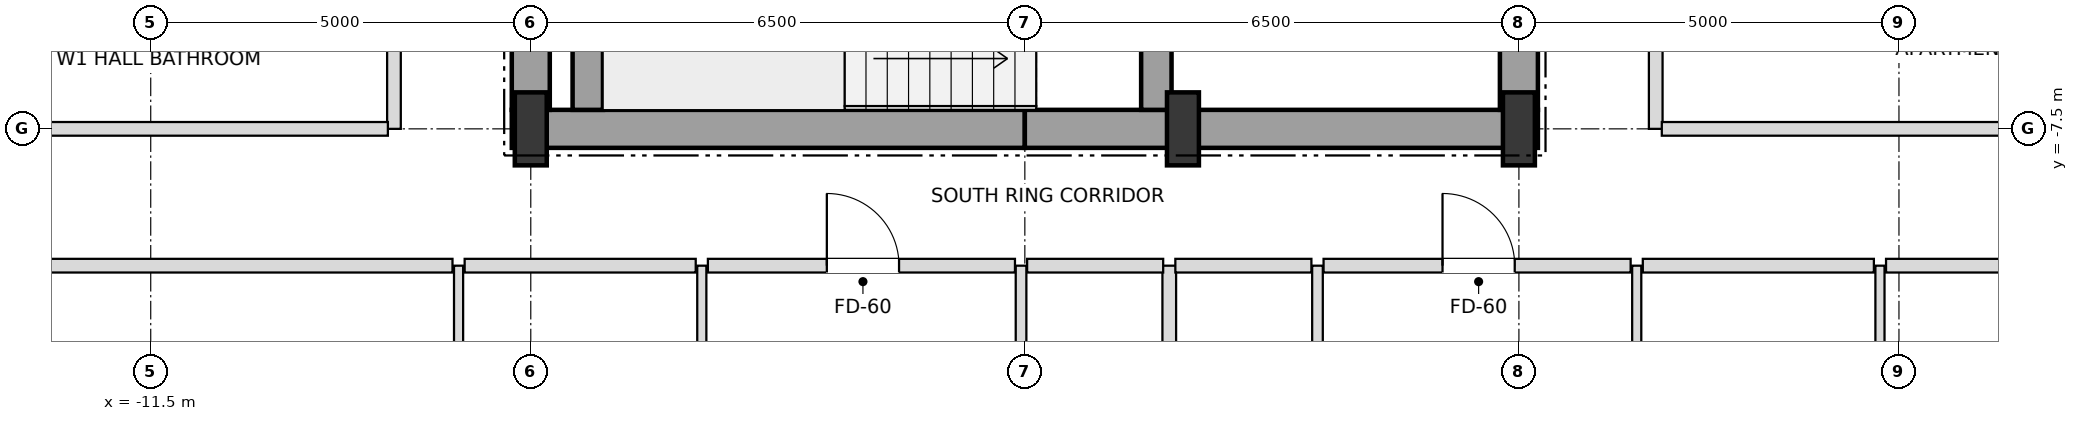
"""IFC4 building model, lengths in metres.
Left out: names, types, materials, properties, quantities, classifications, styles, units other than length and angle.
Written with IfcOpenShell. Run it as: python <this file> out.ifc"""

import sys

from ifc_helpers import new_model, si_unit, direction, frame, frame_2d, origin, origin_2d, place, context, subcontext, project, spatial, rectangle, i_section, extrude, element, fill, save


model = new_model("IFC4")
c1 = context("Model", 3, precision=1e-05, world=origin(), true_north=direction((0.0, 1.0)))
c2 = subcontext(c1, "Body", "Model", "MODEL_VIEW")
j1 = project(units=[si_unit("LENGTHUNIT", "METRE"), si_unit("PLANEANGLEUNIT", "RADIAN")], contexts=[c1])
p1 = place(None, origin())
s1 = spatial("IfcSite", under=j1, at=p1, CompositionType="ELEMENT")
p2 = place(p1, origin())
s2 = spatial("IfcBuilding", under=s1, at=p2, CompositionType="ELEMENT")
p3 = place(p2, frame((0.0, 0.0, 50.4)))
s3 = spatial("IfcBuildingStorey", under=s2, at=p3, CompositionType="ELEMENT", Elevation=50.4)
for number, where, z_axis, x_axis in (
    (1, (-6.5, -7.5, 0.0), (0.0, 0.0, 1.0), (1.0, 0.0, 0.0)),
    (2, (2.08, -7.5, 0.0), (0.0, 0.0, 1.0), (1.0, 0.0, 0.0)),
    (3, (6.5, -7.5, 0.0), (0.0, 0.0, 1.0), (1.0, 0.0, 0.0)),
):
    element("IfcColumn", number, at=place(p3, frame(where, z_axis=z_axis, x_axis=x_axis)), inside=s3, PredefinedType="COLUMN", context=c2, shape_type="SweptSolid", body=[
        extrude(i_section(OverallWidth=0.42, OverallDepth=0.96, WebThickness=0.022, FlangeThickness=0.034, at=origin_2d()), origin(), (0.0, 0.0, 1.0), 3.6),
    ])
for number, where, z_axis, x_axis in (
    (4, (-6.75, -7.5, 0.0), (0.0, 0.0, 1.0), (1.0, 0.0, 0.0)),
    (5, (0.0, -7.5, 0.0), (0.0, 0.0, 1.0), (1.0, 0.0, 0.0)),
):
    element("IfcWall", number, at=place(p3, frame(where, z_axis=z_axis, x_axis=x_axis)), inside=s3, PredefinedType="SHEAR", context=c2, shape_type="SweptSolid", body=[
        extrude(rectangle(XDim=6.75, YDim=0.5, at=frame_2d((3.375, 0.0))), origin(), (0.0, 0.0, 1.0), 3.38),
    ])
p4 = place(p3, frame((-6.5, -7.25, 0.0), z_axis=(0.0, 0.0, 1.0), x_axis=(0.0, 1.0, 0.0)))
e6 = element("IfcWall", 6, at=p4, inside=s3, PredefinedType="SHEAR", context=c2, shape_type="SweptSolid", body=[
    extrude(rectangle(XDim=3.55, YDim=0.5, at=frame_2d((1.775, 0.0))), origin(), (0.0, 0.0, 1.0), 3.38),
])
p5 = place(p3, frame((6.5, -7.25, 0.0), z_axis=(0.0, 0.0, 1.0), x_axis=(0.0, 1.0, 0.0)))
e7 = element("IfcWall", 7, at=p5, inside=s3, PredefinedType="SHEAR", context=c2, shape_type="SweptSolid", body=[
    extrude(rectangle(XDim=5.75, YDim=0.5, at=frame_2d((2.875, 0.0))), origin(), (0.0, 0.0, 1.0), 3.38),
])
p6 = place(p5, frame((0.85, 0.0, 0.0)))
e8 = element("IfcOpeningElement", 8, at=p6, cuts=e7, PredefinedType="OPENING", context=c2, shape_type="SweptSolid", body=[
    extrude(rectangle(XDim=1.05, YDim=2.15, at=frame_2d((0.525, 1.075))), frame((0.0, 0.26, 0.0), z_axis=(0.0, -1.0, 0.0), x_axis=(1.0, 0.0, 0.0)), (0.0, 0.0, 1.0), 0.52),
])
p7 = place(p3, frame((-5.75, -7.25, 0.0), z_axis=(0.0, 0.0, 1.0), x_axis=(0.0, 1.0, 0.0)))
e9 = element("IfcWall", 9, at=p7, inside=s3, PredefinedType="SHEAR", context=c2, shape_type="SweptSolid", body=[
    extrude(rectangle(XDim=2.9, YDim=0.4, at=frame_2d((1.45, 0.0))), origin(), (0.0, 0.0, 1.0), 3.38),
])
p8 = place(p3, frame((1.73, -7.25, 0.0), z_axis=(0.0, 0.0, 1.0), x_axis=(0.0, 1.0, 0.0)))
e10 = element("IfcWall", 10, at=p8, inside=s3, PredefinedType="SHEAR", context=c2, shape_type="SweptSolid", body=[
    extrude(rectangle(XDim=3.3, YDim=0.4, at=frame_2d((1.65, 0.0))), origin(), (0.0, 0.0, 1.0), 3.38),
])
p9 = place(p8, frame((0.9, 0.0, 0.0)))
e11 = element("IfcOpeningElement", 11, at=p9, cuts=e10, PredefinedType="OPENING", context=c2, shape_type="SweptSolid", body=[
    extrude(rectangle(XDim=1.05, YDim=2.15, at=frame_2d((0.525, 1.075))), frame((0.0, 0.21, 0.0), z_axis=(0.0, -1.0, 0.0), x_axis=(1.0, 0.0, 0.0)), (0.0, 0.0, 1.0), 0.42),
])
p10 = place(p3, frame((-8.3, -7.5, 0.0), z_axis=(0.0, 0.0, 1.0), x_axis=(0.0, 1.0, 0.0)))
e12 = element("IfcWall", 12, at=p10, inside=s3, PredefinedType="PARTITIONING", context=c2, shape_type="SweptSolid", body=[
    extrude(rectangle(XDim=15.0, YDim=0.18, at=frame_2d((7.5, 0.0))), origin(), (0.0, 0.0, 1.0), 3.38),
])
p11 = place(p10, frame((3.565, 0.0, 0.0)))
e13 = element("IfcOpeningElement", 13, at=p11, cuts=e12, PredefinedType="OPENING", context=c2, shape_type="SweptSolid", body=[
    extrude(rectangle(XDim=0.95, YDim=2.15, at=frame_2d((0.475, 1.075))), frame((0.0, 0.1, 0.0), z_axis=(0.0, -1.0, 0.0), x_axis=(1.0, 0.0, 0.0)), (0.0, 0.0, 1.0), 0.2),
])
p12 = place(p10, frame((11.145, 0.0, 0.0)))
e14 = element("IfcOpeningElement", 14, at=p12, cuts=e12, PredefinedType="OPENING", context=c2, shape_type="SweptSolid", body=[
    extrude(rectangle(XDim=0.95, YDim=2.15, at=frame_2d((0.475, 1.075))), frame((0.0, 0.1, 0.0), z_axis=(0.0, -1.0, 0.0), x_axis=(1.0, 0.0, 0.0)), (0.0, 0.0, 1.0), 0.2),
])
p13 = place(p3, frame((-7.45, -18.9, 0.0), z_axis=(0.0, 0.0, 1.0), x_axis=(0.0, 1.0, 0.0)))
e15 = element("IfcWall", 15, at=p13, inside=s3, PredefinedType="PARTITIONING", context=c2, shape_type="SweptSolid", body=[
    extrude(rectangle(XDim=9.6, YDim=0.12, at=frame_2d((4.8, 0.0))), origin(), (0.0, 0.0, 1.0), 2.816),
])
p14 = place(p13, frame((4.35, 0.0, 0.0)))
e16 = element("IfcOpeningElement", 16, at=p14, cuts=e15, PredefinedType="OPENING", context=c2, shape_type="SweptSolid", body=[
    extrude(rectangle(XDim=0.9, YDim=2.1, at=frame_2d((0.45, 1.05))), frame((0.0, 0.07, 0.0), z_axis=(0.0, -1.0, 0.0), x_axis=(1.0, 0.0, 0.0)), (0.0, 0.0, 1.0), 0.14),
])
p15 = place(p3, frame((-4.25, -24.9, 0.0), z_axis=(0.0, 0.0, 1.0), x_axis=(0.0, 1.0, 0.0)))
e17 = element("IfcWall", 17, at=p15, inside=s3, PredefinedType="PARTITIONING", context=c2, shape_type="SweptSolid", body=[
    extrude(rectangle(XDim=15.6, YDim=0.12, at=frame_2d((7.8, 0.0))), origin(), (0.0, 0.0, 1.0), 2.816),
])
p16 = place(p15, frame((10.325, 0.0, 0.0)))
e18 = element("IfcOpeningElement", 18, at=p16, cuts=e17, PredefinedType="OPENING", context=c2, shape_type="SweptSolid", body=[
    extrude(rectangle(XDim=0.95, YDim=2.1, at=frame_2d((0.475, 1.05))), frame((0.0, 0.07, 0.0), z_axis=(0.0, -1.0, 0.0), x_axis=(1.0, 0.0, 0.0)), (0.0, 0.0, 1.0), 0.14),
])
p17 = place(p15, frame((2.55, 0.0, 0.0)))
e19 = element("IfcOpeningElement", 19, at=p17, cuts=e17, PredefinedType="OPENING", context=c2, shape_type="SweptSolid", body=[
    extrude(rectangle(XDim=0.9, YDim=2.1, at=frame_2d((0.45, 1.05))), frame((0.0, 0.07, 0.0), z_axis=(0.0, -1.0, 0.0), x_axis=(1.0, 0.0, 0.0)), (0.0, 0.0, 1.0), 0.14),
])
p18 = place(p3, frame((-0.05, -18.9, 0.0), z_axis=(0.0, 0.0, 1.0), x_axis=(0.0, 1.0, 0.0)))
e20 = element("IfcWall", 20, at=p18, inside=s3, PredefinedType="PARTITIONING", context=c2, shape_type="SweptSolid", body=[
    extrude(rectangle(XDim=9.6, YDim=0.14, at=frame_2d((4.8, 0.0))), origin(), (0.0, 0.0, 1.0), 2.948),
])
p19 = place(p18, frame((4.35, 0.0, 0.0)))
e21 = element("IfcOpeningElement", 21, at=p19, cuts=e20, PredefinedType="OPENING", context=c2, shape_type="SweptSolid", body=[
    extrude(rectangle(XDim=0.9, YDim=2.1, at=frame_2d((0.45, 1.05))), frame((0.0, 0.08, 0.0), z_axis=(0.0, -1.0, 0.0), x_axis=(1.0, 0.0, 0.0)), (0.0, 0.0, 1.0), 0.16),
])
p20 = place(p3, frame((1.9, -24.9, 0.0), z_axis=(0.0, 0.0, 1.0), x_axis=(0.0, 1.0, 0.0)))
e22 = element("IfcWall", 22, at=p20, inside=s3, PredefinedType="PARTITIONING", context=c2, shape_type="SweptSolid", body=[
    extrude(rectangle(XDim=15.6, YDim=0.18, at=frame_2d((7.8, 0.0))), origin(), (0.0, 0.0, 1.0), 2.816),
])
p21 = place(p3, frame((3.85, -18.9, 0.0), z_axis=(0.0, 0.0, 1.0), x_axis=(0.0, 1.0, 0.0)))
e23 = element("IfcWall", 23, at=p21, inside=s3, PredefinedType="PARTITIONING", context=c2, shape_type="SweptSolid", body=[
    extrude(rectangle(XDim=9.6, YDim=0.14, at=frame_2d((4.8, 0.0))), origin(), (0.0, 0.0, 1.0), 2.948),
])
p22 = place(p21, frame((4.35, 0.0, 0.0)))
e24 = element("IfcOpeningElement", 24, at=p22, cuts=e23, PredefinedType="OPENING", context=c2, shape_type="SweptSolid", body=[
    extrude(rectangle(XDim=0.9, YDim=2.1, at=frame_2d((0.45, 1.05))), frame((0.0, 0.08, 0.0), z_axis=(0.0, -1.0, 0.0), x_axis=(1.0, 0.0, 0.0)), (0.0, 0.0, 1.0), 0.16),
])
p23 = place(p3, frame((8.05, -24.9, 0.0), z_axis=(0.0, 0.0, 1.0), x_axis=(0.0, 1.0, 0.0)))
e25 = element("IfcWall", 25, at=p23, inside=s3, PredefinedType="PARTITIONING", context=c2, shape_type="SweptSolid", body=[
    extrude(rectangle(XDim=15.6, YDim=0.12, at=frame_2d((7.8, 0.0))), origin(), (0.0, 0.0, 1.0), 2.816),
])
p24 = place(p23, frame((10.325, 0.0, 0.0)))
e26 = element("IfcOpeningElement", 26, at=p24, cuts=e25, PredefinedType="OPENING", context=c2, shape_type="SweptSolid", body=[
    extrude(rectangle(XDim=0.95, YDim=2.1, at=frame_2d((0.475, 1.05))), frame((0.0, 0.07, 0.0), z_axis=(0.0, -1.0, 0.0), x_axis=(1.0, 0.0, 0.0)), (0.0, 0.0, 1.0), 0.14),
])
p25 = place(p23, frame((2.55, 0.0, 0.0)))
e27 = element("IfcOpeningElement", 27, at=p25, cuts=e25, PredefinedType="OPENING", context=c2, shape_type="SweptSolid", body=[
    extrude(rectangle(XDim=0.9, YDim=2.1, at=frame_2d((0.45, 1.05))), frame((0.0, 0.07, 0.0), z_axis=(0.0, -1.0, 0.0), x_axis=(1.0, 0.0, 0.0)), (0.0, 0.0, 1.0), 0.14),
])
p26 = place(p3, frame((8.3, -7.5, 0.0), z_axis=(0.0, 0.0, 1.0), x_axis=(0.0, 1.0, 0.0)))
e28 = element("IfcWall", 28, at=p26, inside=s3, PredefinedType="PARTITIONING", context=c2, shape_type="SweptSolid", body=[
    extrude(rectangle(XDim=15.0, YDim=0.18, at=frame_2d((7.5, 0.0))), origin(), (0.0, 0.0, 1.0), 3.38),
])
p27 = place(p26, frame((3.475, 0.0, 0.0)))
e29 = element("IfcOpeningElement", 29, at=p27, cuts=e28, PredefinedType="OPENING", context=c2, shape_type="SweptSolid", body=[
    extrude(rectangle(XDim=0.95, YDim=2.15, at=frame_2d((0.475, 1.075))), frame((0.0, 0.1, 0.0), z_axis=(0.0, -1.0, 0.0), x_axis=(1.0, 0.0, 0.0)), (0.0, 0.0, 1.0), 0.2),
])
p28 = place(p3, frame((11.25, -18.9, 0.0), z_axis=(0.0, 0.0, 1.0), x_axis=(0.0, 1.0, 0.0)))
e30 = element("IfcWall", 30, at=p28, inside=s3, PredefinedType="PARTITIONING", context=c2, shape_type="SweptSolid", body=[
    extrude(rectangle(XDim=9.6, YDim=0.12, at=frame_2d((4.8, 0.0))), origin(), (0.0, 0.0, 1.0), 2.736),
])
p29 = place(p28, frame((4.325, 0.0, 0.0)))
e31 = element("IfcOpeningElement", 31, at=p29, cuts=e30, PredefinedType="OPENING", context=c2, shape_type="SweptSolid", body=[
    extrude(rectangle(XDim=0.95, YDim=2.1, at=frame_2d((0.475, 1.05))), frame((0.0, 0.07, 0.0), z_axis=(0.0, -1.0, 0.0), x_axis=(1.0, 0.0, 0.0)), (0.0, 0.0, 1.0), 0.14),
])
p30 = place(p3, frame((-18.32, -9.3, 0.0), z_axis=(0.0, 0.0, 1.0), x_axis=(1.0, 0.0, 0.0)))
e32 = element("IfcWall", 32, at=p30, inside=s3, PredefinedType="PARTITIONING", context=c2, shape_type="SweptSolid", body=[
    extrude(rectangle(XDim=10.79, YDim=0.18, at=frame_2d((5.395, 0.0))), origin(), (0.0, 0.0, 1.0), 2.816),
])
p31 = place(p3, frame((-7.37, -9.3, 0.0), z_axis=(0.0, 0.0, 1.0), x_axis=(1.0, 0.0, 0.0)))
e33 = element("IfcWall", 33, at=p31, inside=s3, PredefinedType="PARTITIONING", context=c2, shape_type="SweptSolid", body=[
    extrude(rectangle(XDim=3.04, YDim=0.18, at=frame_2d((1.52, 0.0))), origin(), (0.0, 0.0, 1.0), 2.816),
])
p32 = place(p3, frame((-4.17, -9.3, 0.0), z_axis=(0.0, 0.0, 1.0), x_axis=(1.0, 0.0, 0.0)))
e34 = element("IfcWall", 34, at=p32, inside=s3, PredefinedType="PARTITIONING", context=c2, shape_type="SweptSolid", body=[
    extrude(rectangle(XDim=4.04, YDim=0.18, at=frame_2d((2.02, 0.0))), origin(), (0.0, 0.0, 1.0), 3.38),
])
p33 = place(p32, frame((1.565, 0.0, 0.0)))
e35 = element("IfcOpeningElement", 35, at=p33, cuts=e34, PredefinedType="OPENING", context=c2, shape_type="SweptSolid", body=[
    extrude(rectangle(XDim=0.95, YDim=2.15, at=frame_2d((0.475, 1.075))), frame((0.0, 0.1, 0.0), z_axis=(0.0, -1.0, 0.0), x_axis=(1.0, 0.0, 0.0)), (0.0, 0.0, 1.0), 0.2),
])
for number, where, z_axis, x_axis in (
    (36, (0.03, -9.3, 0.0), (0.0, 0.0, 1.0), (1.0, 0.0, 0.0)),
    (37, (1.98, -9.3, 0.0), (0.0, 0.0, 1.0), (1.0, 0.0, 0.0)),
):
    element("IfcWall", number, at=place(p3, frame(where, z_axis=z_axis, x_axis=x_axis)), inside=s3, PredefinedType="PARTITIONING", context=c2, shape_type="SweptSolid", body=[
        extrude(rectangle(XDim=1.79, YDim=0.18, at=frame_2d((0.895, 0.0))), origin(), (0.0, 0.0, 1.0), 3.38),
    ])
p34 = place(p3, frame((3.93, -9.3, 0.0), z_axis=(0.0, 0.0, 1.0), x_axis=(1.0, 0.0, 0.0)))
e38 = element("IfcWall", 38, at=p34, inside=s3, PredefinedType="PARTITIONING", context=c2, shape_type="SweptSolid", body=[
    extrude(rectangle(XDim=4.04, YDim=0.18, at=frame_2d((2.02, 0.0))), origin(), (0.0, 0.0, 1.0), 2.816),
])
p35 = place(p34, frame((1.565, 0.0, 0.0)))
e39 = element("IfcOpeningElement", 39, at=p35, cuts=e38, PredefinedType="OPENING", context=c2, shape_type="SweptSolid", body=[
    extrude(rectangle(XDim=0.95, YDim=2.15, at=frame_2d((0.475, 1.075))), frame((0.0, 0.1, 0.0), z_axis=(0.0, -1.0, 0.0), x_axis=(1.0, 0.0, 0.0)), (0.0, 0.0, 1.0), 0.2),
])
p36 = place(p3, frame((8.13, -9.3, 0.0), z_axis=(0.0, 0.0, 1.0), x_axis=(1.0, 0.0, 0.0)))
e40 = element("IfcWall", 40, at=p36, inside=s3, PredefinedType="PARTITIONING", context=c2, shape_type="SweptSolid", body=[
    extrude(rectangle(XDim=3.04, YDim=0.18, at=frame_2d((1.52, 0.0))), origin(), (0.0, 0.0, 1.0), 3.38),
])
p37 = place(p3, frame((11.33, -9.3, 0.0), z_axis=(0.0, 0.0, 1.0), x_axis=(1.0, 0.0, 0.0)))
e41 = element("IfcWall", 41, at=p37, inside=s3, PredefinedType="PARTITIONING", context=c2, shape_type="SweptSolid", body=[
    extrude(rectangle(XDim=6.99, YDim=0.18, at=frame_2d((3.495, 0.0))), origin(), (0.0, 0.0, 1.0), 2.816),
])
for number, where, z_axis, x_axis in (
    (42, (-16.02, -7.5, 0.0), (0.0, 0.0, 1.0), (1.0, 0.0, 0.0)),
    (43, (8.38, -7.5, 0.0), (0.0, 0.0, 1.0), (1.0, 0.0, 0.0)),
):
    element("IfcWall", number, at=place(p3, frame(where, z_axis=z_axis, x_axis=x_axis)), inside=s3, PredefinedType="PARTITIONING", context=c2, shape_type="SweptSolid", body=[
        extrude(rectangle(XDim=7.64, YDim=0.18, at=frame_2d((3.82, 0.0))), origin(), (0.0, 0.0, 1.0), 2.816),
    ])
p38 = place(p33, origin())
e44 = element("IfcDoor", 44, at=p38, inside=s3, OperationType="SINGLE_SWING_LEFT", PredefinedType="DOOR", context=c2, shape_type="SweptSolid", body=[
    extrude(rectangle(XDim=0.95, YDim=2.15, at=frame_2d((0.475, 1.075))), frame((0.0, 0.025, 0.0), z_axis=(0.0, -1.0, 0.0), x_axis=(1.0, 0.0, 0.0)), (0.0, 0.0, 1.0), 0.05),
])
fill(e35, e44)
p39 = place(p35, origin())
e45 = element("IfcDoor", 45, at=p39, inside=s3, OperationType="SINGLE_SWING_LEFT", PredefinedType="DOOR", context=c2, shape_type="SweptSolid", body=[
    extrude(rectangle(XDim=0.95, YDim=2.15, at=frame_2d((0.475, 1.075))), frame((0.0, 0.025, 0.0), z_axis=(0.0, -1.0, 0.0), x_axis=(1.0, 0.0, 0.0)), (0.0, 0.0, 1.0), 0.05),
])
fill(e39, e45)
save(model, sys.argv[1])
